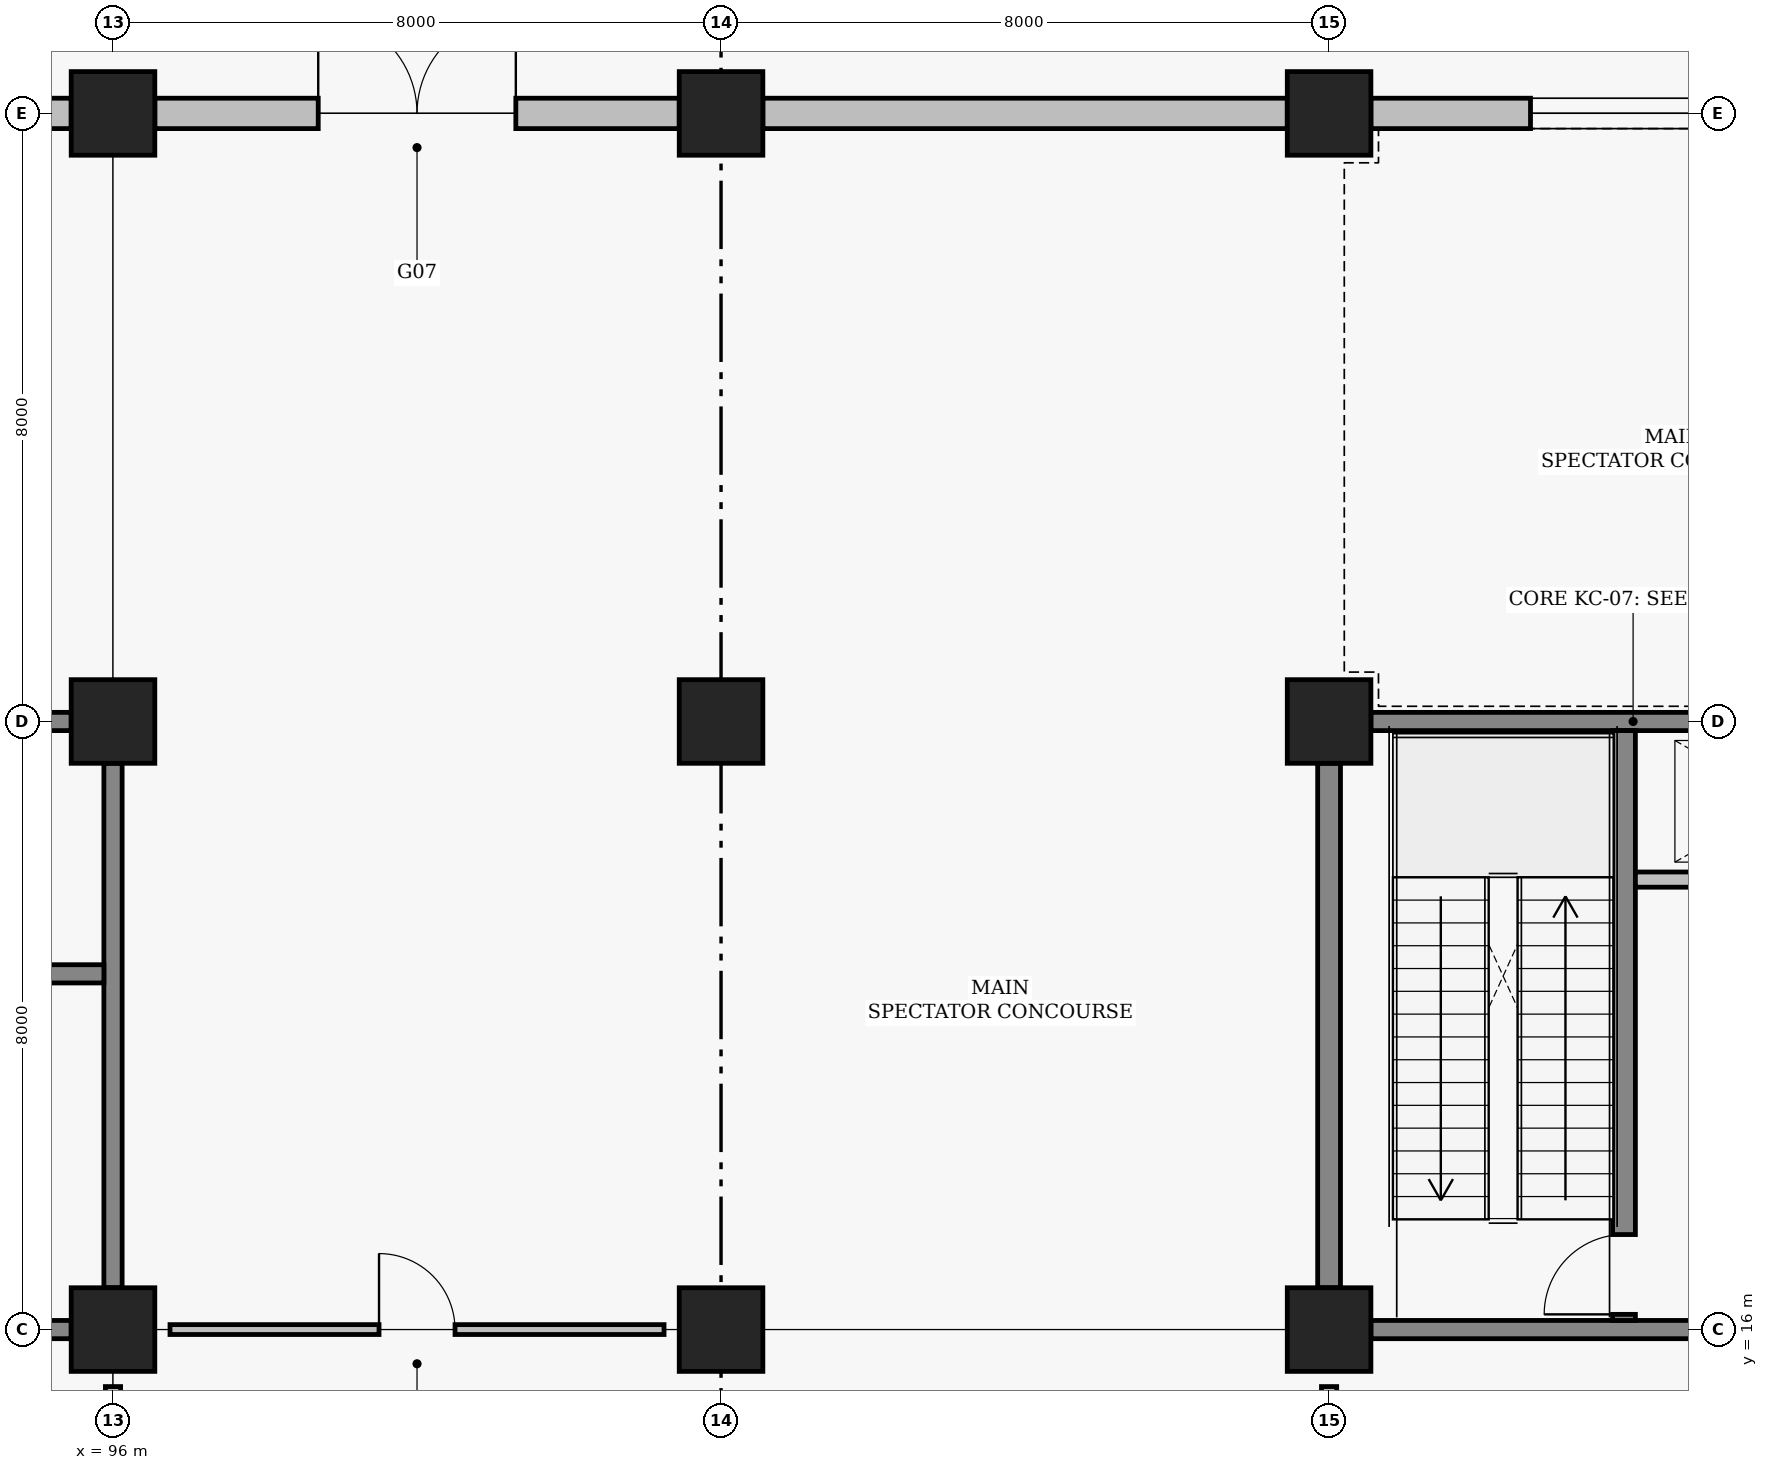
"""IFC4 building model, lengths in metres.
Left out: names, types, materials, properties, quantities, classifications, styles, units other than length and angle.
Written with IfcOpenShell. Run it as: python <this file> out.ifc"""

import sys

from ifc_helpers import new_model, si_unit, direction, frame, frame_2d, origin, origin_2d, place, context, subcontext, project, spatial, rectangle, extrude, element, fill, save


model = new_model("IFC4")
c1 = context("Model", 3, precision=1e-05, world=origin(), true_north=direction((0.0, 1.0)))
c2 = subcontext(c1, "Body", "Model", "MODEL_VIEW")
j1 = project(units=[si_unit("LENGTHUNIT", "METRE"), si_unit("PLANEANGLEUNIT", "RADIAN")], contexts=[c1])
p1 = place(None, origin())
s1 = spatial("IfcSite", under=j1, at=p1, CompositionType="ELEMENT")
p2 = place(p1, origin())
s2 = spatial("IfcBuilding", under=s1, at=p2, CompositionType="ELEMENT")
p3 = place(p2, origin())
s3 = spatial("IfcBuildingStorey", under=s2, at=p3, CompositionType="ELEMENT", Elevation=0.0)
for number, where, z_axis, x_axis in (
    (1, (96.0, 16.0, 0.0), (0.0, 0.0, 1.0), (1.0, 0.0, 0.0)),
    (2, (96.0, 24.0, 0.0), (0.0, 0.0, 1.0), (1.0, 0.0, 0.0)),
    (3, (96.0, 32.0, 0.0), (0.0, 0.0, 1.0), (1.0, 0.0, 0.0)),
    (4, (104.0, 16.0, 0.0), (0.0, 0.0, 1.0), (1.0, 0.0, 0.0)),
    (5, (104.0, 24.0, 0.0), (0.0, 0.0, 1.0), (1.0, 0.0, 0.0)),
    (6, (104.0, 32.0, 0.0), (0.0, 0.0, 1.0), (1.0, 0.0, 0.0)),
    (7, (112.0, 16.0, 0.0), (0.0, 0.0, 1.0), (1.0, 0.0, 0.0)),
    (8, (112.0, 24.0, 0.0), (0.0, 0.0, 1.0), (1.0, 0.0, 0.0)),
    (9, (112.0, 32.0, 0.0), (0.0, 0.0, 1.0), (1.0, 0.0, 0.0)),
):
    element("IfcColumn", number, at=place(p3, frame(where, z_axis=z_axis, x_axis=x_axis)), inside=s3, PredefinedType="COLUMN", context=c2, shape_type="SweptSolid", body=[
        extrude(rectangle(XDim=1.1, YDim=1.1, at=origin_2d()), origin(), (0.0, 0.0, 1.0), 4.8),
    ])
p4 = place(p3, frame((88.55, 32.0, 0.0), z_axis=(0.0, 0.0, 1.0), x_axis=(1.0, 0.0, 0.0)))
e10 = element("IfcWall", 10, at=p4, inside=s3, PredefinedType="SOLIDWALL", context=c2, shape_type="SweptSolid", body=[
    extrude(rectangle(XDim=6.9, YDim=0.4, at=frame_2d((3.45, 0.0))), origin(), (0.0, 0.0, 1.0), 3.81),
])
p5 = place(p3, frame((96.55, 32.0, 0.0), z_axis=(0.0, 0.0, 1.0), x_axis=(1.0, 0.0, 0.0)))
e11 = element("IfcWall", 11, at=p5, inside=s3, PredefinedType="SOLIDWALL", context=c2, shape_type="SweptSolid", body=[
    extrude(rectangle(XDim=6.9, YDim=0.4, at=frame_2d((3.45, 0.0))), origin(), (0.0, 0.0, 1.0), 3.81),
])
p6 = place(p5, frame((2.15, 0.0, 0.0)))
e12 = element("IfcOpeningElement", 12, at=p6, cuts=e11, PredefinedType="OPENING", context=c2, shape_type="SweptSolid", body=[
    extrude(rectangle(XDim=2.6, YDim=2.5, at=frame_2d((1.3, 1.25))), frame((0.0, 0.21, 0.0), z_axis=(0.0, -1.0, 0.0), x_axis=(1.0, 0.0, 0.0)), (0.0, 0.0, 1.0), 0.42),
])
p7 = place(p3, frame((104.55, 32.0, 0.0), z_axis=(0.0, 0.0, 1.0), x_axis=(1.0, 0.0, 0.0)))
e13 = element("IfcWall", 13, at=p7, inside=s3, PredefinedType="SOLIDWALL", context=c2, shape_type="SweptSolid", body=[
    extrude(rectangle(XDim=6.9, YDim=0.4, at=frame_2d((3.45, 0.0))), origin(), (0.0, 0.0, 1.0), 3.81),
])
p8 = place(p3, frame((112.55, 32.0, 0.0), z_axis=(0.0, 0.0, 1.0), x_axis=(1.0, 0.0, 0.0)))
e14 = element("IfcWall", 14, at=p8, inside=s3, PredefinedType="SOLIDWALL", context=c2, shape_type="SweptSolid", body=[
    extrude(rectangle(XDim=6.9, YDim=0.4, at=frame_2d((3.45, 0.0))), origin(), (0.0, 0.0, 1.0), 3.81),
])
p9 = place(p8, frame((2.1, 0.0, 0.95)))
e15 = element("IfcOpeningElement", 15, at=p9, cuts=e14, PredefinedType="OPENING", context=c2, shape_type="SweptSolid", body=[
    extrude(rectangle(XDim=2.7, YDim=2.1, at=frame_2d((1.35, 1.05))), frame((0.0, 0.21, 0.0), z_axis=(0.0, -1.0, 0.0), x_axis=(1.0, 0.0, 0.0)), (0.0, 0.0, 1.0), 0.42),
])
p10 = place(p3, frame((88.55, 16.0, 0.0), z_axis=(0.0, 0.0, 1.0), x_axis=(1.0, 0.0, 0.0)))
e16 = element("IfcWall", 16, at=p10, inside=s3, PredefinedType="SHEAR", context=c2, shape_type="SweptSolid", body=[
    extrude(rectangle(XDim=6.9, YDim=0.24, at=frame_2d((3.45, 0.0))), origin(), (0.0, 0.0, 1.0), 2.34),
])
p11 = place(p10, frame((4.75, 0.0, 0.0)))
e17 = element("IfcOpeningElement", 17, at=p11, cuts=e16, PredefinedType="OPENING", context=c2, shape_type="SweptSolid", body=[
    extrude(rectangle(XDim=1.1, YDim=2.2, at=frame_2d((0.55, 1.1))), frame((0.0, 0.13, 0.0), z_axis=(0.0, -1.0, 0.0), x_axis=(1.0, 0.0, 0.0)), (0.0, 0.0, 1.0), 0.26),
])
for number, where, z_axis, x_axis in (
    (18, (88.55, 24.0, 0.0), (0.0, 0.0, 1.0), (1.0, 0.0, 0.0)),
    (19, (96.0, 16.55, 0.0), (0.0, 0.0, 1.0), (0.0, 1.0, 0.0)),
):
    element("IfcWall", number, at=place(p3, frame(where, z_axis=z_axis, x_axis=x_axis)), inside=s3, PredefinedType="SHEAR", context=c2, shape_type="SweptSolid", body=[
        extrude(rectangle(XDim=6.9, YDim=0.24, at=frame_2d((3.45, 0.0))), origin(), (0.0, 0.0, 1.0), 3.66),
    ])
p12 = place(p3, frame((92.0, 20.68, 0.0), z_axis=(0.0, 0.0, 1.0), x_axis=(1.0, 0.0, 0.0)))
e20 = element("IfcWall", 20, at=p12, inside=s3, PredefinedType="SHEAR", context=c2, shape_type="SweptSolid", body=[
    extrude(rectangle(XDim=3.88, YDim=0.24, at=frame_2d((1.94, 0.0))), origin(), (0.0, 0.0, 1.0), 3.81),
])
p13 = place(p12, frame((1.0, 0.0, 0.0)))
e21 = element("IfcOpeningElement", 21, at=p13, cuts=e20, PredefinedType="OPENING", context=c2, shape_type="SweptSolid", body=[
    extrude(rectangle(XDim=1.1, YDim=2.15, at=frame_2d((0.55, 1.075))), frame((0.0, 0.13, 0.0), z_axis=(0.0, -1.0, 0.0), x_axis=(1.0, 0.0, 0.0)), (0.0, 0.0, 1.0), 0.26),
])
p14 = place(p3, frame((112.55, 16.0, 0.0), z_axis=(0.0, 0.0, 1.0), x_axis=(1.0, 0.0, 0.0)))
e22 = element("IfcWall", 22, at=p14, inside=s3, PredefinedType="SHEAR", context=c2, shape_type="SweptSolid", body=[
    extrude(rectangle(XDim=6.9, YDim=0.24, at=frame_2d((3.45, 0.0))), origin(), (0.0, 0.0, 1.0), 3.66),
])
p15 = place(p14, frame((4.75, 0.0, 0.0)))
e23 = element("IfcOpeningElement", 23, at=p15, cuts=e22, PredefinedType="OPENING", context=c2, shape_type="SweptSolid", body=[
    extrude(rectangle(XDim=1.1, YDim=2.2, at=frame_2d((0.55, 1.1))), frame((0.0, 0.13, 0.0), z_axis=(0.0, -1.0, 0.0), x_axis=(1.0, 0.0, 0.0)), (0.0, 0.0, 1.0), 0.26),
])
p16 = place(p3, frame((112.55, 24.0, 0.0), z_axis=(0.0, 0.0, 1.0), x_axis=(1.0, 0.0, 0.0)))
e24 = element("IfcWall", 24, at=p16, inside=s3, PredefinedType="SHEAR", context=c2, shape_type="SweptSolid", body=[
    extrude(rectangle(XDim=6.9, YDim=0.24, at=frame_2d((3.45, 0.0))), origin(), (0.0, 0.0, 1.0), 3.81),
])
p17 = place(p3, frame((112.0, 16.55, 0.0), z_axis=(0.0, 0.0, 1.0), x_axis=(0.0, 1.0, 0.0)))
e25 = element("IfcWall", 25, at=p17, inside=s3, PredefinedType="SHEAR", context=c2, shape_type="SweptSolid", body=[
    extrude(rectangle(XDim=6.9, YDim=0.3, at=frame_2d((3.45, 0.0))), origin(), (0.0, 0.0, 1.0), 3.66),
])
p18 = place(p3, frame((115.88, 16.12, 0.0), z_axis=(0.0, 0.0, 1.0), x_axis=(0.0, 1.0, 0.0)))
e26 = element("IfcWall", 26, at=p18, inside=s3, PredefinedType="SHEAR", context=c2, shape_type="SweptSolid", body=[
    extrude(rectangle(XDim=7.76, YDim=0.3, at=frame_2d((3.88, 0.0))), origin(), (0.0, 0.0, 1.0), 4.01),
])
p19 = place(p18, frame((0.08, 0.0, 0.0)))
e27 = element("IfcOpeningElement", 27, at=p19, cuts=e26, PredefinedType="OPENING", context=c2, shape_type="SweptSolid", body=[
    extrude(rectangle(XDim=1.05, YDim=2.15, at=frame_2d((0.525, 1.075))), frame((0.0, 0.16, 0.0), z_axis=(0.0, -1.0, 0.0), x_axis=(1.0, 0.0, 0.0)), (0.0, 0.0, 1.0), 0.32),
])
p20 = place(p3, frame((116.03, 21.92, 0.0), z_axis=(0.0, 0.0, 1.0), x_axis=(1.0, 0.0, 0.0)))
e28 = element("IfcWall", 28, at=p20, inside=s3, PredefinedType="PARTITIONING", context=c2, shape_type="SweptSolid", body=[
    extrude(rectangle(XDim=3.82, YDim=0.2, at=frame_2d((1.91, 0.0))), origin(), (0.0, 0.0, 1.0), 3.81),
])
p21 = place(p20, frame((1.25, 0.0, 0.0)))
e29 = element("IfcOpeningElement", 29, at=p21, cuts=e28, PredefinedType="OPENING", context=c2, shape_type="SweptSolid", body=[
    extrude(rectangle(XDim=0.85, YDim=2.05, at=frame_2d((0.425, 1.025))), frame((0.0, 0.11, 0.0), z_axis=(0.0, -1.0, 0.0), x_axis=(1.0, 0.0, 0.0)), (0.0, 0.0, 1.0), 0.22),
])
for number, where, z_axis, x_axis in (
    (30, (96.0, 8.75, 0.0), (0.0, 0.0, 1.0), (0.0, 1.0, 0.0)),
    (31, (112.0, 8.75, 0.0), (0.0, 0.0, 1.0), (0.0, 1.0, 0.0)),
):
    element("IfcWall", number, at=place(p3, frame(where, z_axis=z_axis, x_axis=x_axis)), inside=s3, PredefinedType="PARTITIONING", context=c2, shape_type="SweptSolid", body=[
        extrude(rectangle(XDim=6.5, YDim=0.2, at=frame_2d((3.25, 0.0))), origin(), (0.0, 0.0, 1.0), 3.81),
    ])
p22 = place(p3, frame((96.75, 16.0, 0.0), z_axis=(0.0, 0.0, 1.0), x_axis=(1.0, 0.0, 0.0)))
e32 = element("IfcWall", 32, at=p22, inside=s3, PredefinedType="PARTITIONING", context=c2, shape_type="SweptSolid", body=[
    extrude(rectangle(XDim=6.5, YDim=0.13, at=frame_2d((3.25, 0.0))), origin(), (0.0, 0.0, 1.0), 3.91),
])
p23 = place(p22, frame((2.75, 0.0, 0.0)))
e33 = element("IfcOpeningElement", 33, at=p23, cuts=e32, PredefinedType="OPENING", context=c2, shape_type="SweptSolid", body=[
    extrude(rectangle(XDim=1.0, YDim=2.1, at=frame_2d((0.5, 1.05))), frame((0.0, 0.075, 0.0), z_axis=(0.0, -1.0, 0.0), x_axis=(1.0, 0.0, 0.0)), (0.0, 0.0, 1.0), 0.15),
])
p24 = place(p6, origin())
e34 = element("IfcDoor", 34, at=p24, inside=s3, OperationType="DOUBLE_SWING_LEFT", PredefinedType="DOOR", context=c2, shape_type="SweptSolid", body=[
    extrude(rectangle(XDim=2.6, YDim=2.5, at=frame_2d((1.3, 1.25))), frame((0.0, 0.025, 0.0), z_axis=(0.0, -1.0, 0.0), x_axis=(1.0, 0.0, 0.0)), (0.0, 0.0, 1.0), 0.05),
])
fill(e12, e34)
p25 = place(p9, origin())
e35 = element("IfcWindow", 35, at=p25, inside=s3, PartitioningType="SINGLE_PANEL", PredefinedType="WINDOW", context=c2, shape_type="SweptSolid", body=[
    extrude(rectangle(XDim=2.7, YDim=2.1, at=frame_2d((1.35, 1.05))), frame((0.0, 0.03, 0.0), z_axis=(0.0, -1.0, 0.0), x_axis=(1.0, 0.0, 0.0)), (0.0, 0.0, 1.0), 0.06),
])
fill(e15, e35)
p26 = place(p19, origin())
e36 = element("IfcDoor", 36, at=p26, inside=s3, OperationType="SINGLE_SWING_LEFT", PredefinedType="DOOR", context=c2, shape_type="SweptSolid", body=[
    extrude(rectangle(XDim=1.05, YDim=2.15, at=frame_2d((0.525, 1.075))), frame((0.0, 0.025, 0.0), z_axis=(0.0, -1.0, 0.0), x_axis=(1.0, 0.0, 0.0)), (0.0, 0.0, 1.0), 0.05),
])
fill(e27, e36)
p27 = place(p23, origin())
e37 = element("IfcDoor", 37, at=p27, inside=s3, OperationType="SINGLE_SWING_LEFT", PredefinedType="DOOR", context=c2, shape_type="SweptSolid", body=[
    extrude(rectangle(XDim=1.0, YDim=2.1, at=frame_2d((0.5, 1.05))), frame((0.0, 0.025, 0.0), z_axis=(0.0, -1.0, 0.0), x_axis=(1.0, 0.0, 0.0)), (0.0, 0.0, 1.0), 0.05),
])
fill(e33, e37)
save(model, sys.argv[1])
